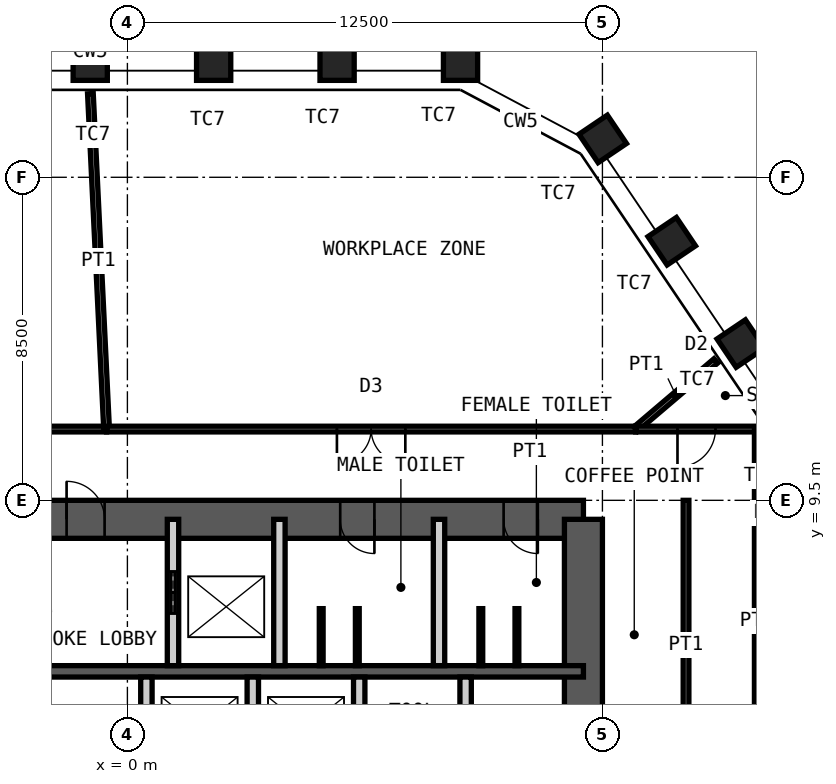
"""IFC4 building model, lengths in metres.
Left out: names, types, materials, properties, quantities, classifications, styles, units other than length and angle.
Written with IfcOpenShell. Run it as: python <this file> out.ifc"""

import sys

from ifc_helpers import new_model, si_unit, direction, frame, frame_2d, origin, origin_2d, place, context, subcontext, project, spatial, rectangle, hollow_rectangle, extrude, element, fill, save


model = new_model("IFC4")
c1 = context("Model", 3, precision=1e-05, world=origin(), true_north=direction((0.0, 1.0)))
c2 = subcontext(c1, "Body", "Model", "MODEL_VIEW")
j1 = project(units=[si_unit("LENGTHUNIT", "METRE"), si_unit("PLANEANGLEUNIT", "RADIAN")], contexts=[c1])
p1 = place(None, origin())
s1 = spatial("IfcSite", under=j1, at=p1, CompositionType="ELEMENT")
p2 = place(p1, origin())
s2 = spatial("IfcBuilding", under=s1, at=p2, CompositionType="ELEMENT")
p3 = place(p2, frame((0.0, 0.0, 291.4)))
s3 = spatial("IfcBuildingStorey", under=s2, at=p3, CompositionType="ELEMENT", Elevation=291.4)
for number, where, z_axis, x_axis in (
    (1, (-0.978, 21.0, 0.0), (0.0, 0.0, 1.0), (-1.0, 0.0, 0.0)),
    (2, (2.27, 21.0, 0.0), (0.0, 0.0, 1.0), (-1.0, 0.0, 0.0)),
    (3, (5.518, 21.0, 0.0), (0.0, 0.0, 1.0), (-1.0, 0.0, 0.0)),
    (4, (8.766, 21.0, 0.0), (0.0, 0.0, 1.0), (-1.0, 0.0, 0.0)),
    (5, (12.508, 19.01, 0.0), (0.0, 0.0, 1.0), (-0.559, 0.829, 0.0)),
    (6, (14.324, 16.318, 0.0), (0.0, 0.0, 1.0), (-0.559, 0.829, 0.0)),
    (7, (16.141, 13.625, 0.0), (0.0, 0.0, 1.0), (-0.559, 0.829, 0.0)),
):
    element("IfcColumn", number, at=place(p3, frame(where, z_axis=z_axis, x_axis=x_axis)), inside=s3, PredefinedType="COLUMN", context=c2, shape_type="SweptSolid", body=[
        extrude(hollow_rectangle(XDim=0.9, YDim=0.9, WallThickness=0.06, at=origin_2d()), origin(), (0.0, 0.0, 1.0), 4.2),
    ])
p4 = place(p3, frame((-12.0, 9.0, 0.0), z_axis=(0.0, 0.0, 1.0), x_axis=(1.0, 0.0, 0.0)))
e8 = element("IfcWall", 8, at=p4, inside=s3, PredefinedType="SHEAR", context=c2, shape_type="SweptSolid", body=[
    extrude(rectangle(XDim=24.0, YDim=1.0, at=frame_2d((12.0, 0.0))), origin(), (0.0, 0.0, 1.0), 4.2),
])
p5 = place(p4, frame((10.4, 0.0, 0.0)))
e9 = element("IfcOpeningElement", 9, at=p5, cuts=e8, PredefinedType="OPENING", context=c2, shape_type="SweptSolid", body=[
    extrude(rectangle(XDim=1.0, YDim=2.1, at=frame_2d((0.5, 1.05))), frame((0.0, 0.51, 0.0), z_axis=(0.0, -1.0, 0.0), x_axis=(1.0, 0.0, 0.0)), (0.0, 0.0, 1.0), 1.02),
])
p6 = place(p4, frame((17.6, 0.0, 0.0)))
e10 = element("IfcOpeningElement", 10, at=p6, cuts=e8, PredefinedType="OPENING", context=c2, shape_type="SweptSolid", body=[
    extrude(rectangle(XDim=0.9, YDim=2.1, at=frame_2d((0.45, 1.05))), frame((0.0, 0.51, 0.0), z_axis=(0.0, -1.0, 0.0), x_axis=(1.0, 0.0, 0.0)), (0.0, 0.0, 1.0), 1.02),
])
p7 = place(p4, frame((21.9, 0.0, 0.0)))
e11 = element("IfcOpeningElement", 11, at=p7, cuts=e8, PredefinedType="OPENING", context=c2, shape_type="SweptSolid", body=[
    extrude(rectangle(XDim=0.9, YDim=2.1, at=frame_2d((0.45, 1.05))), frame((0.0, 0.51, 0.0), z_axis=(0.0, -1.0, 0.0), x_axis=(1.0, 0.0, 0.0)), (0.0, 0.0, 1.0), 1.02),
])
p8 = place(p3, frame((12.0, -9.0, 0.0), z_axis=(0.0, 0.0, 1.0), x_axis=(0.0, 1.0, 0.0)))
e12 = element("IfcWall", 12, at=p8, inside=s3, PredefinedType="SHEAR", context=c2, shape_type="SweptSolid", body=[
    extrude(rectangle(XDim=18.0, YDim=1.0, at=frame_2d((9.0, 0.0))), origin(), (0.0, 0.0, 1.0), 4.2),
])
p9 = place(p8, frame((8.1, 0.0, 0.0)))
e13 = element("IfcOpeningElement", 13, at=p9, cuts=e12, PredefinedType="OPENING", context=c2, shape_type="SweptSolid", body=[
    extrude(rectangle(XDim=1.8, YDim=2.1, at=frame_2d((0.9, 1.05))), frame((0.0, 0.51, 0.0), z_axis=(0.0, -1.0, 0.0), x_axis=(1.0, 0.0, 0.0)), (0.0, 0.0, 1.0), 1.02),
])
p10 = place(p3, frame((-12.0, 5.0, 0.0), z_axis=(0.0, 0.0, 1.0), x_axis=(1.0, 0.0, 0.0)))
e14 = element("IfcWall", 14, at=p10, inside=s3, PredefinedType="SHEAR", context=c2, shape_type="SweptSolid", body=[
    extrude(rectangle(XDim=24.0, YDim=0.3, at=frame_2d((12.0, 0.0))), origin(), (0.0, 0.0, 1.0), 4.2),
])
p11 = place(p3, frame((1.2, 5.15, 0.0), z_axis=(0.0, 0.0, 1.0), x_axis=(0.0, 1.0, 0.0)))
e15 = element("IfcWall", 15, at=p11, inside=s3, PredefinedType="PARTITIONING", context=c2, shape_type="SweptSolid", body=[
    extrude(rectangle(XDim=3.85, YDim=0.3, at=frame_2d((1.925, 0.0))), origin(), (0.0, 0.0, 1.0), 3.98),
])
p12 = place(p11, frame((1.375, 0.0, 0.0)))
e16 = element("IfcOpeningElement", 16, at=p12, cuts=e15, PredefinedType="OPENING", context=c2, shape_type="SweptSolid", body=[
    extrude(rectangle(XDim=1.1, YDim=2.4, at=frame_2d((0.55, 1.2))), frame((0.0, 0.16, 0.0), z_axis=(0.0, -1.0, 0.0), x_axis=(1.0, 0.0, 0.0)), (0.0, 0.0, 1.0), 0.32),
])
for number, where, z_axis, x_axis in (
    (17, (4.0, 5.15, 0.0), (0.0, 0.0, 1.0), (0.0, 1.0, 0.0)),
    (18, (8.2, 5.15, 0.0), (0.0, 0.0, 1.0), (0.0, 1.0, 0.0)),
):
    element("IfcWall", number, at=place(p3, frame(where, z_axis=z_axis, x_axis=x_axis)), inside=s3, PredefinedType="PARTITIONING", context=c2, shape_type="SweptSolid", body=[
        extrude(rectangle(XDim=3.85, YDim=0.3, at=frame_2d((1.925, 0.0))), origin(), (0.0, 0.0, 1.0), 3.98),
    ])
for number, where, z_axis, x_axis in (
    (19, (0.5, 2.2, 0.0), (0.0, 0.0, 1.0), (0.0, 1.0, 0.0)),
    (20, (3.3, 2.2, 0.0), (0.0, 0.0, 1.0), (0.0, 1.0, 0.0)),
    (21, (6.1, 2.2, 0.0), (0.0, 0.0, 1.0), (0.0, 1.0, 0.0)),
    (22, (8.9, 2.2, 0.0), (0.0, 0.0, 1.0), (0.0, 1.0, 0.0)),
):
    element("IfcWall", number, at=place(p3, frame(where, z_axis=z_axis, x_axis=x_axis)), inside=s3, PredefinedType="PARTITIONING", context=c2, shape_type="SweptSolid", body=[
        extrude(rectangle(XDim=2.65, YDim=0.3, at=frame_2d((1.325, 0.0))), origin(), (0.0, 0.0, 1.0), 3.98),
    ])
for number, where, z_axis, x_axis in (
    (23, (5.1, 5.15, 0.0), (0.0, 0.0, 1.0), (0.0, 1.0, 0.0)),
    (24, (6.05, 5.15, 0.0), (0.0, 0.0, 1.0), (0.0, 1.0, 0.0)),
    (25, (9.3, 5.15, 0.0), (0.0, 0.0, 1.0), (0.0, 1.0, 0.0)),
    (26, (10.25, 5.15, 0.0), (0.0, 0.0, 1.0), (0.0, 1.0, 0.0)),
):
    element("IfcWall", number, at=place(p3, frame(where, z_axis=z_axis, x_axis=x_axis)), inside=s3, PredefinedType="PARTITIONING", context=c2, shape_type="SweptSolid", body=[
        extrude(rectangle(XDim=1.5, YDim=0.1, at=frame_2d((0.75, 0.0))), origin(), (0.0, 0.0, 1.0), 2.1),
    ])
p13 = place(p3, frame((-8.312, 11.375, 0.0), z_axis=(0.0, 0.0, 1.0), x_axis=(1.0, 0.0, 0.0)))
e27 = element("IfcWall", 27, at=p13, inside=s3, PredefinedType="PARTITIONING", context=c2, shape_type="SweptSolid", body=[
    extrude(rectangle(XDim=7.764, YDim=0.15, at=frame_2d((3.882, 0.0))), origin(), (0.0, 0.0, 1.0), 4.03),
])
p14 = place(p13, frame((2.982, 0.0, 0.0)))
e28 = element("IfcOpeningElement", 28, at=p14, cuts=e27, PredefinedType="OPENING", context=c2, shape_type="SweptSolid", body=[
    extrude(rectangle(XDim=1.8, YDim=2.4, at=frame_2d((0.9, 1.2))), frame((0.0, 0.085, 0.0), z_axis=(0.0, -1.0, 0.0), x_axis=(1.0, 0.0, 0.0)), (0.0, 0.0, 1.0), 0.17),
])
p15 = place(p3, frame((-0.973, 20.2, 0.0), z_axis=(0.0, 0.0, 1.0), x_axis=(0.048134910622, -0.998840843368, 0.0)))
e29 = element("IfcWall", 29, at=p15, inside=s3, PredefinedType="PARTITIONING", context=c2, shape_type="SweptSolid", body=[
    extrude(rectangle(XDim=8.835, YDim=0.15, at=frame_2d((4.418, 0.0))), origin(), (0.0, 0.0, 1.0), 3.33),
])
p16 = place(p3, frame((-0.548, 11.375, 0.0), z_axis=(0.0, 0.0, 1.0), x_axis=(1.0, 0.0, 0.0)))
e30 = element("IfcWall", 30, at=p16, inside=s3, PredefinedType="PARTITIONING", context=c2, shape_type="SweptSolid", body=[
    extrude(rectangle(XDim=13.923, YDim=0.15, at=frame_2d((6.961, 0.0))), origin(), (0.0, 0.0, 1.0), 4.03),
])
p17 = place(p16, frame((6.062, 0.0, 0.0)))
e31 = element("IfcOpeningElement", 31, at=p17, cuts=e30, PredefinedType="OPENING", context=c2, shape_type="SweptSolid", body=[
    extrude(rectangle(XDim=1.8, YDim=2.4, at=frame_2d((0.9, 1.2))), frame((0.0, 0.085, 0.0), z_axis=(0.0, -1.0, 0.0), x_axis=(1.0, 0.0, 0.0)), (0.0, 0.0, 1.0), 0.17),
])
p18 = place(p3, frame((15.484, 13.169, 0.0), z_axis=(0.0, 0.0, 1.0), x_axis=(-0.761734753955, -0.647889006403, 0.0)))
e32 = element("IfcWall", 32, at=p18, inside=s3, PredefinedType="PARTITIONING", context=c2, shape_type="SweptSolid", body=[
    extrude(rectangle(XDim=2.769, YDim=0.15, at=frame_2d((1.384, 0.0))), origin(), (0.0, 0.0, 1.0), 3.33),
])
p19 = place(p3, frame((13.375, 11.375, 0.0), z_axis=(0.0, 0.0, 1.0), x_axis=(1.0, 0.0, 0.0)))
e33 = element("IfcWall", 33, at=p19, inside=s3, PredefinedType="PARTITIONING", context=c2, shape_type="SweptSolid", body=[
    extrude(rectangle(XDim=3.2, YDim=0.15, at=frame_2d((1.6, 0.0))), origin(), (0.0, 0.0, 1.0), 4.03),
])
p20 = place(p19, frame((1.1, 0.0, 0.0)))
e34 = element("IfcOpeningElement", 34, at=p20, cuts=e33, PredefinedType="OPENING", context=c2, shape_type="SweptSolid", body=[
    extrude(rectangle(XDim=1.0, YDim=2.4, at=frame_2d((0.5, 1.2))), frame((0.0, 0.085, 0.0), z_axis=(0.0, -1.0, 0.0), x_axis=(1.0, 0.0, 0.0)), (0.0, 0.0, 1.0), 0.17),
])
p21 = place(p3, frame((16.575, 11.375, 0.0), z_axis=(0.0, 0.0, 1.0), x_axis=(0.0, -1.0, 0.0)))
e35 = element("IfcWall", 35, at=p21, inside=s3, PredefinedType="PARTITIONING", context=c2, shape_type="SweptSolid", body=[
    extrude(rectangle(XDim=1.321, YDim=0.15, at=frame_2d((0.66, 0.0))), origin(), (0.0, 0.0, 1.0), 4.03),
])
p22 = place(p3, frame((17.291, 10.489, 0.0), z_axis=(0.0, 0.0, 1.0), x_axis=(-0.855013745288, -0.518605336811, 0.0)))
e36 = element("IfcWall", 36, at=p22, inside=s3, PredefinedType="PARTITIONING", context=c2, shape_type="SweptSolid", body=[
    extrude(rectangle(XDim=0.837, YDim=0.15, at=frame_2d((0.419, 0.0))), origin(), (0.0, 0.0, 1.0), 3.33),
])
p23 = place(p3, frame((16.575, 10.054, 0.0), z_axis=(0.0, 0.0, 1.0), x_axis=(0.0, -1.0, 0.0)))
e37 = element("IfcWall", 37, at=p23, inside=s3, PredefinedType="PARTITIONING", context=c2, shape_type="SweptSolid", body=[
    extrude(rectangle(XDim=18.588, YDim=0.15, at=frame_2d((9.294, 0.0))), origin(), (0.0, 0.0, 1.0), 4.03),
])
p24 = place(p23, frame((8.394, 0.0, 0.0)))
e38 = element("IfcOpeningElement", 38, at=p24, cuts=e37, PredefinedType="OPENING", context=c2, shape_type="SweptSolid", body=[
    extrude(rectangle(XDim=1.8, YDim=2.4, at=frame_2d((0.9, 1.2))), frame((0.0, 0.085, 0.0), z_axis=(0.0, -1.0, 0.0), x_axis=(1.0, 0.0, 0.0)), (0.0, 0.0, 1.0), 0.17),
])
p25 = place(p3, frame((14.7, 1.9, 0.0), z_axis=(0.0, 0.0, 1.0), x_axis=(0.0, 1.0, 0.0)))
e39 = element("IfcWall", 39, at=p25, inside=s3, PredefinedType="PARTITIONING", context=c2, shape_type="SweptSolid", body=[
    extrude(rectangle(XDim=7.6, YDim=0.15, at=frame_2d((3.8, 0.0))), origin(), (0.0, 0.0, 1.0), 4.03),
])
p26 = place(p5, origin())
e40 = element("IfcDoor", 40, at=p26, inside=s3, OperationType="SINGLE_SWING_RIGHT", PredefinedType="DOOR", context=c2, shape_type="SweptSolid", body=[
    extrude(rectangle(XDim=1.0, YDim=2.1, at=frame_2d((0.5, 1.05))), frame((0.0, 0.025, 0.0), z_axis=(0.0, -1.0, 0.0), x_axis=(1.0, 0.0, 0.0)), (0.0, 0.0, 1.0), 0.05),
])
fill(e9, e40)
p27 = place(p6, origin())
e41 = element("IfcDoor", 41, at=p27, inside=s3, OperationType="SINGLE_SWING_RIGHT", PredefinedType="DOOR", context=c2, shape_type="SweptSolid", body=[
    extrude(rectangle(XDim=0.9, YDim=2.1, at=frame_2d((0.45, 1.05))), frame((0.0, 0.025, 0.0), z_axis=(0.0, -1.0, 0.0), x_axis=(1.0, 0.0, 0.0)), (0.0, 0.0, 1.0), 0.05),
])
fill(e10, e41)
p28 = place(p7, origin())
e42 = element("IfcDoor", 42, at=p28, inside=s3, OperationType="SINGLE_SWING_RIGHT", PredefinedType="DOOR", context=c2, shape_type="SweptSolid", body=[
    extrude(rectangle(XDim=0.9, YDim=2.1, at=frame_2d((0.45, 1.05))), frame((0.0, 0.025, 0.0), z_axis=(0.0, -1.0, 0.0), x_axis=(1.0, 0.0, 0.0)), (0.0, 0.0, 1.0), 0.05),
])
fill(e11, e42)
p29 = place(p12, origin())
e43 = element("IfcDoor", 43, at=p29, inside=s3, OperationType="DOUBLE_DOOR_SLIDING", PredefinedType="DOOR", context=c2, shape_type="SweptSolid", body=[
    extrude(rectangle(XDim=1.1, YDim=2.4, at=frame_2d((0.55, 1.2))), frame((0.0, 0.025, 0.0), z_axis=(0.0, -1.0, 0.0), x_axis=(1.0, 0.0, 0.0)), (0.0, 0.0, 1.0), 0.05),
])
fill(e16, e43)
p30 = place(p17, origin())
e44 = element("IfcDoor", 44, at=p30, inside=s3, OperationType="DOUBLE_DOOR_DOUBLE_SWING", PredefinedType="DOOR", context=c2, shape_type="SweptSolid", body=[
    extrude(rectangle(XDim=1.8, YDim=2.4, at=frame_2d((0.9, 1.2))), frame((0.0, 0.025, 0.0), z_axis=(0.0, -1.0, 0.0), x_axis=(1.0, 0.0, 0.0)), (0.0, 0.0, 1.0), 0.05),
])
fill(e31, e44)
p31 = place(p20, origin())
e45 = element("IfcDoor", 45, at=p31, inside=s3, OperationType="SINGLE_SWING_LEFT", PredefinedType="DOOR", context=c2, shape_type="SweptSolid", body=[
    extrude(rectangle(XDim=1.0, YDim=2.4, at=frame_2d((0.5, 1.2))), frame((0.0, 0.025, 0.0), z_axis=(0.0, -1.0, 0.0), x_axis=(1.0, 0.0, 0.0)), (0.0, 0.0, 1.0), 0.05),
])
fill(e34, e45)
save(model, sys.argv[1])
